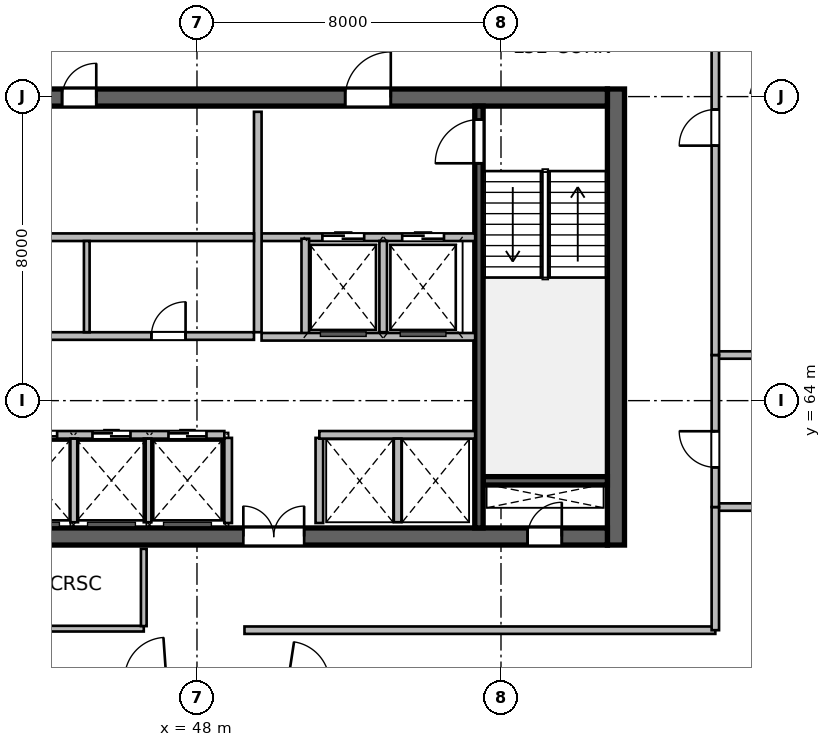
"""IFC4 building model, lengths in metres.
Left out: names, types, materials, properties, quantities, classifications, styles, units other than length and angle.
Written with IfcOpenShell. Run it as: python <this file> out.ifc"""

import sys

from ifc_helpers import new_model, si_unit, direction, frame, frame_2d, origin, place, context, subcontext, project, spatial, rectangle, extrude, source, transform, mapped, element, fill, save


model = new_model("IFC4")
c1 = context("Model", 3, precision=1e-05, world=origin(), true_north=direction((0.0, 1.0)))
c2 = subcontext(c1, "Body", "Model", "MODEL_VIEW")
j1 = project(units=[si_unit("LENGTHUNIT", "METRE"), si_unit("PLANEANGLEUNIT", "RADIAN")], contexts=[c1])
p1 = place(None, origin())
s1 = spatial("IfcSite", under=j1, at=p1, CompositionType="ELEMENT")
p2 = place(p1, origin())
s2 = spatial("IfcBuilding", under=s1, at=p2, CompositionType="ELEMENT")
p3 = place(p2, frame((0.0, 0.0, 215.7)))
s3 = spatial("IfcBuildingStorey", under=s2, at=p3, CompositionType="ELEMENT", Elevation=215.7)
m1 = source(origin(), c2, "Body", "SweptSolid", [
    extrude(rectangle(XDim=12.0, YDim=0.45, at=frame_2d((6.0, 0.0))), origin(), (0.0, 0.0, 1.0), 3.9),
])
p4 = place(p3, frame((59.025, 60.2, 0.0), z_axis=(0.0, 0.0, 1.0), x_axis=(0.0, 1.0, 0.0)))
e1 = element("IfcWall", 1, at=p4, inside=s3, PredefinedType="SHEAR", context=c2, shape_type="MappedRepresentation", body=[
    mapped(m1, transform((0.0, 0.0, 0.0), scale=1.0)),
])
m2 = source(origin(), c2, "Body", "SweptSolid", [
    extrude(rectangle(XDim=21.6, YDim=0.45, at=frame_2d((10.8, 0.0))), origin(), (0.0, 0.0, 1.0), 3.9),
])
p5 = place(p3, frame((37.2, 60.425, 0.0), z_axis=(0.0, 0.0, 1.0), x_axis=(1.0, 0.0, 0.0)))
e2 = element("IfcWall", 2, at=p5, inside=s3, PredefinedType="SHEAR", context=c2, shape_type="MappedRepresentation", body=[
    mapped(m2, transform((0.0, 0.0, 0.0), scale=1.0)),
])
p6 = place(p5, frame((1.1, 0.0, 0.0)))
e3 = element("IfcOpeningElement", 3, at=p6, cuts=e2, PredefinedType="OPENING", context=c2, shape_type="SweptSolid", body=[
    extrude(rectangle(XDim=1.15, YDim=2.15, at=frame_2d((0.575, 1.075))), frame((0.0, 0.235, 0.0), z_axis=(0.0, -1.0, 0.0), x_axis=(1.0, 0.0, 0.0)), (0.0, 0.0, 1.0), 0.47),
])
p7 = place(p5, frame((19.5, 0.0, 0.0)))
e4 = element("IfcOpeningElement", 4, at=p7, cuts=e2, PredefinedType="OPENING", context=c2, shape_type="SweptSolid", body=[
    extrude(rectangle(XDim=0.9, YDim=2.1, at=frame_2d((0.45, 1.05))), frame((0.0, 0.235, 0.0), z_axis=(0.0, -1.0, 0.0), x_axis=(1.0, 0.0, 0.0)), (0.0, 0.0, 1.0), 0.47),
])
p8 = place(p5, frame((12.02, 0.0, 0.0)))
e5 = element("IfcOpeningElement", 5, at=p8, cuts=e2, PredefinedType="OPENING", context=c2, shape_type="SweptSolid", body=[
    extrude(rectangle(XDim=1.6, YDim=2.15, at=frame_2d((0.8, 1.075))), frame((0.0, 0.235, 0.0), z_axis=(0.0, -1.0, 0.0), x_axis=(1.0, 0.0, 0.0)), (0.0, 0.0, 1.0), 0.47),
])
p9 = place(p3, frame((37.2, 71.975, 0.0), z_axis=(0.0, 0.0, 1.0), x_axis=(1.0, 0.0, 0.0)))
e6 = element("IfcWall", 6, at=p9, inside=s3, PredefinedType="SHEAR", context=c2, shape_type="MappedRepresentation", body=[
    mapped(m2, transform((0.0, 0.0, 0.0), scale=1.0)),
])
p10 = place(p9, frame((1.2, 0.0, 0.0)))
e7 = element("IfcOpeningElement", 7, at=p10, cuts=e6, PredefinedType="OPENING", context=c2, shape_type="SweptSolid", body=[
    extrude(rectangle(XDim=0.9, YDim=2.1, at=frame_2d((0.45, 1.05))), frame((0.0, 0.235, 0.0), z_axis=(0.0, -1.0, 0.0), x_axis=(1.0, 0.0, 0.0)), (0.0, 0.0, 1.0), 0.47),
])
p11 = place(p9, frame((14.7, 0.0, 0.0)))
e8 = element("IfcOpeningElement", 8, at=p11, cuts=e6, PredefinedType="OPENING", context=c2, shape_type="SweptSolid", body=[
    extrude(rectangle(XDim=1.2, YDim=2.15, at=frame_2d((0.6, 1.075))), frame((0.0, 0.235, 0.0), z_axis=(0.0, -1.0, 0.0), x_axis=(1.0, 0.0, 0.0)), (0.0, 0.0, 1.0), 0.47),
])
p12 = place(p9, frame((4.15, 0.0, 0.0)))
e9 = element("IfcOpeningElement", 9, at=p12, cuts=e6, PredefinedType="OPENING", context=c2, shape_type="SweptSolid", body=[
    extrude(rectangle(XDim=1.3, YDim=2.15, at=frame_2d((0.65, 1.075))), frame((0.0, 0.235, 0.0), z_axis=(0.0, -1.0, 0.0), x_axis=(1.0, 0.0, 0.0)), (0.0, 0.0, 1.0), 0.47),
])
p13 = place(p9, frame((7.25, 0.0, 0.0)))
e10 = element("IfcOpeningElement", 10, at=p13, cuts=e6, PredefinedType="OPENING", context=c2, shape_type="SweptSolid", body=[
    extrude(rectangle(XDim=0.9, YDim=2.1, at=frame_2d((0.45, 1.05))), frame((0.0, 0.235, 0.0), z_axis=(0.0, -1.0, 0.0), x_axis=(1.0, 0.0, 0.0)), (0.0, 0.0, 1.0), 0.47),
])
m3 = source(origin(), c2, "Body", "SweptSolid", [
    extrude(rectangle(XDim=3.27, YDim=0.22, at=frame_2d((1.635, 0.0))), origin(), (0.0, 0.0, 1.0), 3.9),
])
p14 = place(p3, frame((55.53, 61.89, 0.0), z_axis=(0.0, 0.0, 1.0), x_axis=(1.0, 0.0, 0.0)))
e11 = element("IfcWall", 11, at=p14, inside=s3, PredefinedType="SHEAR", context=c2, shape_type="MappedRepresentation", body=[
    mapped(m3, transform((0.0, 0.0, 0.0), scale=1.0)),
])
m4 = source(origin(), c2, "Body", "SweptSolid", [
    extrude(rectangle(XDim=11.1, YDim=0.22, at=frame_2d((5.55, 0.0))), origin(), (0.0, 0.0, 1.0), 3.9),
])
p15 = place(p3, frame((55.42, 60.65, 0.0), z_axis=(0.0, 0.0, 1.0), x_axis=(0.0, 1.0, 0.0)))
e12 = element("IfcWall", 12, at=p15, inside=s3, PredefinedType="SHEAR", context=c2, shape_type="MappedRepresentation", body=[
    mapped(m4, transform((0.0, 0.0, 0.0), scale=1.0)),
])
p16 = place(p15, frame((9.595, 0.0, 0.0)))
e13 = element("IfcOpeningElement", 13, at=p16, cuts=e12, PredefinedType="OPENING", context=c2, shape_type="SweptSolid", body=[
    extrude(rectangle(XDim=1.15, YDim=2.15, at=frame_2d((0.575, 1.075))), frame((0.0, 0.12, 0.0), z_axis=(0.0, -1.0, 0.0), x_axis=(1.0, 0.0, 0.0)), (0.0, 0.0, 1.0), 0.24),
])
m5 = source(origin(), c2, "Body", "SweptSolid", [
    extrude(rectangle(XDim=2.24, YDim=0.2, at=frame_2d((1.12, 0.0))), origin(), (0.0, 0.0, 1.0), 3.64),
])
for number, where, z_axis, x_axis in (
    (14, (48.82, 60.78, 0.0), (0.0, 0.0, 1.0), (0.0, 1.0, 0.0)),
    (15, (51.22, 60.78, 0.0), (0.0, 0.0, 1.0), (0.0, 1.0, 0.0)),
):
    element("IfcWall", number, at=place(p3, frame(where, z_axis=z_axis, x_axis=x_axis)), inside=s3, PredefinedType="SOLIDWALL", context=c2, shape_type="MappedRepresentation", body=[
        mapped(m5, transform((0.0, 0.0, 0.0), scale=1.0)),
    ])
m6 = source(origin(), c2, "Body", "SweptSolid", [
    extrude(rectangle(XDim=5.62, YDim=0.2, at=frame_2d((2.81, 0.0))), origin(), (0.0, 0.0, 1.0), 3.64),
])
p17 = place(p3, frame((49.7, 68.3, 0.0), z_axis=(0.0, 0.0, 1.0), x_axis=(1.0, 0.0, 0.0)))
e16 = element("IfcWall", 16, at=p17, inside=s3, PredefinedType="SOLIDWALL", context=c2, shape_type="MappedRepresentation", body=[
    mapped(m6, transform((0.0, 0.0, 0.0), scale=1.0)),
])
p18 = place(p17, frame((1.6, 0.0, 0.0)))
e17 = element("IfcOpeningElement", 17, at=p18, cuts=e16, PredefinedType="OPENING", context=c2, shape_type="SweptSolid", body=[
    extrude(rectangle(XDim=1.1, YDim=2.15, at=frame_2d((0.55, 1.075))), frame((0.0, 0.11, 0.0), z_axis=(0.0, -1.0, 0.0), x_axis=(1.0, 0.0, 0.0)), (0.0, 0.0, 1.0), 0.22),
])
p19 = place(p17, frame((3.7, 0.0, 0.0)))
e18 = element("IfcOpeningElement", 18, at=p19, cuts=e16, PredefinedType="OPENING", context=c2, shape_type="SweptSolid", body=[
    extrude(rectangle(XDim=1.1, YDim=2.15, at=frame_2d((0.55, 1.075))), frame((0.0, 0.11, 0.0), z_axis=(0.0, -1.0, 0.0), x_axis=(1.0, 0.0, 0.0)), (0.0, 0.0, 1.0), 0.22),
])
m7 = source(origin(), c2, "Body", "SweptSolid", [
    extrude(rectangle(XDim=5.8, YDim=0.2, at=frame_2d((2.9, 0.0))), origin(), (0.0, 0.0, 1.0), 3.64),
])
p20 = place(p3, frame((49.6, 65.8, 0.0), z_axis=(0.0, 0.0, 1.0), x_axis=(0.0, 1.0, 0.0)))
e19 = element("IfcWall", 19, at=p20, inside=s3, PredefinedType="SOLIDWALL", context=c2, shape_type="MappedRepresentation", body=[
    mapped(m7, transform((0.0, 0.0, 0.0), scale=1.0)),
])
m8 = source(origin(), c2, "Body", "SweptSolid", [
    extrude(rectangle(XDim=2.58, YDim=0.2, at=frame_2d((1.29, 0.0))), origin(), (0.0, 0.0, 1.0), 3.64),
])
p21 = place(p3, frame((50.85, 65.68, 0.0), z_axis=(0.0, 0.0, 1.0), x_axis=(0.0, 1.0, 0.0)))
e20 = element("IfcWall", 20, at=p21, inside=s3, PredefinedType="SOLIDWALL", context=c2, shape_type="MappedRepresentation", body=[
    mapped(m8, transform((0.0, 0.0, 0.0), scale=1.0)),
])
m9 = source(origin(), c2, "Body", "SweptSolid", [
    extrude(rectangle(XDim=2.4, YDim=0.2, at=frame_2d((1.2, 0.0))), origin(), (0.0, 0.0, 1.0), 3.64),
])
p22 = place(p3, frame((52.9, 65.8, 0.0), z_axis=(0.0, 0.0, 1.0), x_axis=(0.0, 1.0, 0.0)))
e21 = element("IfcWall", 21, at=p22, inside=s3, PredefinedType="SOLIDWALL", context=c2, shape_type="MappedRepresentation", body=[
    mapped(m9, transform((0.0, 0.0, 0.0), scale=1.0)),
])
p23 = place(p3, frame((49.7, 65.68, 0.0), z_axis=(0.0, 0.0, 1.0), x_axis=(1.0, 0.0, 0.0)))
e22 = element("IfcWall", 22, at=p23, inside=s3, PredefinedType="SOLIDWALL", context=c2, shape_type="MappedRepresentation", body=[
    mapped(m6, transform((0.0, 0.0, 0.0), scale=1.0)),
])
m10 = source(origin(), c2, "Body", "SweptSolid", [
    extrude(rectangle(XDim=8.8, YDim=0.2, at=frame_2d((4.4, 0.0))), origin(), (0.0, 0.0, 1.0), 3.64),
])
p24 = place(p3, frame((40.7, 68.3, 0.0), z_axis=(0.0, 0.0, 1.0), x_axis=(1.0, 0.0, 0.0)))
e23 = element("IfcWall", 23, at=p24, inside=s3, PredefinedType="SOLIDWALL", context=c2, shape_type="MappedRepresentation", body=[
    mapped(m10, transform((0.0, 0.0, 0.0), scale=1.0)),
])
m11 = source(origin(), c2, "Body", "SweptSolid", [
    extrude(rectangle(XDim=8.02, YDim=0.2, at=frame_2d((4.01, 0.0))), origin(), (0.0, 0.0, 1.0), 3.64),
])
p25 = place(p3, frame((40.7, 63.1, 0.0), z_axis=(0.0, 0.0, 1.0), x_axis=(1.0, 0.0, 0.0)))
e24 = element("IfcWall", 24, at=p25, inside=s3, PredefinedType="SOLIDWALL", context=c2, shape_type="MappedRepresentation", body=[
    mapped(m11, transform((0.0, 0.0, 0.0), scale=1.0)),
])
p26 = place(p25, frame((0.72, 0.0, 0.0)))
e25 = element("IfcOpeningElement", 25, at=p26, cuts=e24, PredefinedType="OPENING", context=c2, shape_type="SweptSolid", body=[
    extrude(rectangle(XDim=1.0, YDim=2.15, at=frame_2d((0.5, 1.075))), frame((0.0, 0.11, 0.0), z_axis=(0.0, -1.0, 0.0), x_axis=(1.0, 0.0, 0.0)), (0.0, 0.0, 1.0), 0.22),
])
p27 = place(p25, frame((2.62, 0.0, 0.0)))
e26 = element("IfcOpeningElement", 26, at=p27, cuts=e24, PredefinedType="OPENING", context=c2, shape_type="SweptSolid", body=[
    extrude(rectangle(XDim=1.0, YDim=2.15, at=frame_2d((0.5, 1.075))), frame((0.0, 0.11, 0.0), z_axis=(0.0, -1.0, 0.0), x_axis=(1.0, 0.0, 0.0)), (0.0, 0.0, 1.0), 0.22),
])
p28 = place(p25, frame((4.55, 0.0, 0.0)))
e27 = element("IfcOpeningElement", 27, at=p28, cuts=e24, PredefinedType="OPENING", context=c2, shape_type="SweptSolid", body=[
    extrude(rectangle(XDim=1.0, YDim=2.15, at=frame_2d((0.5, 1.075))), frame((0.0, 0.11, 0.0), z_axis=(0.0, -1.0, 0.0), x_axis=(1.0, 0.0, 0.0)), (0.0, 0.0, 1.0), 0.22),
])
p29 = place(p25, frame((6.55, 0.0, 0.0)))
e28 = element("IfcOpeningElement", 28, at=p29, cuts=e24, PredefinedType="OPENING", context=c2, shape_type="SweptSolid", body=[
    extrude(rectangle(XDim=1.0, YDim=2.15, at=frame_2d((0.5, 1.075))), frame((0.0, 0.11, 0.0), z_axis=(0.0, -1.0, 0.0), x_axis=(1.0, 0.0, 0.0)), (0.0, 0.0, 1.0), 0.22),
])
m12 = source(origin(), c2, "Body", "SweptSolid", [
    extrude(rectangle(XDim=4.1, YDim=0.2, at=frame_2d((2.05, 0.0))), origin(), (0.0, 0.0, 1.0), 3.64),
])
p30 = place(p3, frame((51.22, 63.1, 0.0), z_axis=(0.0, 0.0, 1.0), x_axis=(1.0, 0.0, 0.0)))
e29 = element("IfcWall", 29, at=p30, inside=s3, PredefinedType="SOLIDWALL", context=c2, shape_type="MappedRepresentation", body=[
    mapped(m12, transform((0.0, 0.0, 0.0), scale=1.0)),
])
m13 = source(origin(), c2, "Body", "SweptSolid", [
    extrude(rectangle(XDim=2.2, YDim=0.2, at=frame_2d((1.1, 0.0))), origin(), (0.0, 0.0, 1.0), 3.64),
])
for number, where, z_axis, x_axis in (
    (30, (44.77, 60.8, 0.0), (0.0, 0.0, 1.0), (0.0, 1.0, 0.0)),
    (31, (46.7, 60.8, 0.0), (0.0, 0.0, 1.0), (0.0, 1.0, 0.0)),
    (32, (53.28, 60.8, 0.0), (0.0, 0.0, 1.0), (0.0, 1.0, 0.0)),
):
    element("IfcWall", number, at=place(p3, frame(where, z_axis=z_axis, x_axis=x_axis)), inside=s3, PredefinedType="SOLIDWALL", context=c2, shape_type="MappedRepresentation", body=[
        mapped(m13, transform((0.0, 0.0, 0.0), scale=1.0)),
    ])
p31 = place(p3, frame((40.7, 65.7, 0.0), z_axis=(0.0, 0.0, 1.0), x_axis=(1.0, 0.0, 0.0)))
e33 = element("IfcWall", 33, at=p31, inside=s3, PredefinedType="SOLIDWALL", context=c2, shape_type="MappedRepresentation", body=[
    mapped(m10, transform((0.0, 0.0, 0.0), scale=1.0)),
])
p32 = place(p31, frame((1.6, 0.0, 0.0)))
e34 = element("IfcOpeningElement", 34, at=p32, cuts=e33, PredefinedType="OPENING", context=c2, shape_type="SweptSolid", body=[
    extrude(rectangle(XDim=0.9, YDim=2.1, at=frame_2d((0.45, 1.05))), frame((0.0, 0.11, 0.0), z_axis=(0.0, -1.0, 0.0), x_axis=(1.0, 0.0, 0.0)), (0.0, 0.0, 1.0), 0.22),
])
p33 = place(p31, frame((6.1, 0.0, 0.0)))
e35 = element("IfcOpeningElement", 35, at=p33, cuts=e33, PredefinedType="OPENING", context=c2, shape_type="SweptSolid", body=[
    extrude(rectangle(XDim=0.9, YDim=2.1, at=frame_2d((0.45, 1.05))), frame((0.0, 0.11, 0.0), z_axis=(0.0, -1.0, 0.0), x_axis=(1.0, 0.0, 0.0)), (0.0, 0.0, 1.0), 0.22),
])
m14 = source(origin(), c2, "Body", "SweptSolid", [
    extrude(rectangle(XDim=2.4, YDim=0.15, at=frame_2d((1.2, 0.0))), origin(), (0.0, 0.0, 1.0), 3.64),
])
p34 = place(p3, frame((45.1, 65.8, 0.0), z_axis=(0.0, 0.0, 1.0), x_axis=(0.0, 1.0, 0.0)))
e36 = element("IfcWall", 36, at=p34, inside=s3, PredefinedType="PARTITIONING", context=c2, shape_type="MappedRepresentation", body=[
    mapped(m14, transform((0.0, 0.0, 0.0), scale=1.0)),
])
m15 = source(origin(), c2, "Body", "SweptSolid", [
    extrude(rectangle(XDim=5.4, YDim=0.15, at=frame_2d((2.7, 0.0))), origin(), (0.0, 0.0, 1.0), 3.64),
])
p35 = place(p3, frame((41.2, 58.0, 0.0), z_axis=(0.0, 0.0, 1.0), x_axis=(1.0, 0.0, 0.0)))
e37 = element("IfcWall", 37, at=p35, inside=s3, PredefinedType="PARTITIONING", context=c2, shape_type="MappedRepresentation", body=[
    mapped(m15, transform((0.0, 0.0, 0.0), scale=1.0)),
])
m16 = source(origin(), c2, "Body", "SweptSolid", [
    extrude(rectangle(XDim=2.033, YDim=0.15, at=frame_2d((1.016, 0.0))), origin(), (0.0, 0.0, 1.0), 3.64),
])
p36 = place(p3, frame((46.6, 58.067, 0.0), z_axis=(0.0, 0.0, 1.0), x_axis=(0.0, 1.0, 0.0)))
e38 = element("IfcWall", 38, at=p36, inside=s3, PredefinedType="PARTITIONING", context=c2, shape_type="MappedRepresentation", body=[
    mapped(m16, transform((0.0, 0.0, 0.0), scale=1.0)),
])
m17 = source(origin(), c2, "Body", "SweptSolid", [
    extrude(rectangle(XDim=12.39, YDim=0.195, at=frame_2d((6.195, 0.0))), origin(), (0.0, 0.0, 1.0), 3.64),
])
p37 = place(p3, frame((49.25, 57.96, 0.0), z_axis=(0.0, 0.0, 1.0), x_axis=(1.0, 0.0, 0.0)))
e39 = element("IfcWall", 39, at=p37, inside=s3, PredefinedType="PARTITIONING", context=c2, shape_type="MappedRepresentation", body=[
    mapped(m17, transform((0.0, 0.0, 0.0), scale=1.0)),
])
m18 = source(origin(), c2, "Body", "SweptSolid", [
    extrude(rectangle(XDim=18.342, YDim=0.195, at=frame_2d((9.171, 0.0))), origin(), (0.0, 0.0, 1.0), 3.64),
])
p38 = place(p3, frame((61.64, 61.2, 0.0), z_axis=(0.0, 0.0, 1.0), x_axis=(1.0, 0.0, 0.0)))
e40 = element("IfcWall", 40, at=p38, inside=s3, PredefinedType="PARTITIONING", context=c2, shape_type="MappedRepresentation", body=[
    mapped(m18, transform((0.0, 0.0, 0.0), scale=1.0)),
])
m19 = source(origin(), c2, "Body", "SweptSolid", [
    extrude(rectangle(XDim=3.24, YDim=0.195, at=frame_2d((1.62, 0.0))), origin(), (0.0, 0.0, 1.0), 3.64),
])
p39 = place(p3, frame((61.64, 57.96, 0.0), z_axis=(0.0, 0.0, 1.0), x_axis=(0.0, 1.0, 0.0)))
e41 = element("IfcWall", 41, at=p39, inside=s3, PredefinedType="PARTITIONING", context=c2, shape_type="MappedRepresentation", body=[
    mapped(m19, transform((0.0, 0.0, 0.0), scale=1.0)),
])
m20 = source(origin(), c2, "Body", "SweptSolid", [
    extrude(rectangle(XDim=15.332, YDim=0.195, at=frame_2d((7.666, 0.0))), origin(), (0.0, 0.0, 1.0), 3.64),
])
p40 = place(p3, frame((61.64, 65.2, 0.0), z_axis=(0.0, 0.0, 1.0), x_axis=(1.0, 0.0, 0.0)))
e42 = element("IfcWall", 42, at=p40, inside=s3, PredefinedType="PARTITIONING", context=c2, shape_type="MappedRepresentation", body=[
    mapped(m20, transform((0.0, 0.0, 0.0), scale=1.0)),
])
m21 = source(origin(), c2, "Body", "SweptSolid", [
    extrude(rectangle(XDim=4.0, YDim=0.195, at=frame_2d((2.0, 0.0))), origin(), (0.0, 0.0, 1.0), 3.64),
])
p41 = place(p3, frame((61.64, 61.2, 0.0), z_axis=(0.0, 0.0, 1.0), x_axis=(0.0, 1.0, 0.0)))
e43 = element("IfcWall", 43, at=p41, inside=s3, PredefinedType="PARTITIONING", context=c2, shape_type="MappedRepresentation", body=[
    mapped(m21, transform((0.0, 0.0, 0.0), scale=1.0)),
])
p42 = place(p41, frame((1.045, 0.0, 0.0)))
e44 = element("IfcOpeningElement", 44, at=p42, cuts=e43, PredefinedType="OPENING", context=c2, shape_type="SweptSolid", body=[
    extrude(rectangle(XDim=0.95, YDim=2.1, at=frame_2d((0.475, 1.05))), frame((0.0, 0.107, 0.0), z_axis=(0.0, -1.0, 0.0), x_axis=(1.0, 0.0, 0.0)), (0.0, 0.0, 1.0), 0.215),
])
m22 = source(origin(), c2, "Body", "SweptSolid", [
    extrude(rectangle(XDim=11.969, YDim=0.195, at=frame_2d((5.984, 0.0))), origin(), (0.0, 0.0, 1.0), 3.64),
])
p43 = place(p3, frame((61.64, 65.2, 0.0), z_axis=(0.0, 0.0, 1.0), x_axis=(0.0, 1.0, 0.0)))
e45 = element("IfcWall", 45, at=p43, inside=s3, PredefinedType="PARTITIONING", context=c2, shape_type="MappedRepresentation", body=[
    mapped(m22, transform((0.0, 0.0, 0.0), scale=1.0)),
])
p44 = place(p43, frame((5.51, 0.0, 0.0)))
e46 = element("IfcOpeningElement", 46, at=p44, cuts=e45, PredefinedType="OPENING", context=c2, shape_type="SweptSolid", body=[
    extrude(rectangle(XDim=0.95, YDim=2.1, at=frame_2d((0.475, 1.05))), frame((0.0, 0.107, 0.0), z_axis=(0.0, -1.0, 0.0), x_axis=(1.0, 0.0, 0.0)), (0.0, 0.0, 1.0), 0.215),
])
m23 = source(origin(), c2, "Body", "SweptSolid", [
    extrude(rectangle(XDim=0.9, YDim=2.1, at=frame_2d((0.45, 1.05))), frame((0.0, 0.025, 0.0), z_axis=(0.0, -1.0, 0.0), x_axis=(1.0, 0.0, 0.0)), (0.0, 0.0, 1.0), 0.05),
])
p45 = place(p7, origin())
e47 = element("IfcDoor", 47, at=p45, inside=s3, OperationType="SINGLE_SWING_RIGHT", PredefinedType="DOOR", context=c2, shape_type="MappedRepresentation", body=[
    mapped(m23, transform((0.0, 0.0, 0.0), scale=1.0)),
])
fill(e4, e47)
m24 = source(origin(), c2, "Body", "SweptSolid", [
    extrude(rectangle(XDim=1.15, YDim=2.15, at=frame_2d((0.575, 1.075))), frame((0.0, 0.025, 0.0), z_axis=(0.0, -1.0, 0.0), x_axis=(1.0, 0.0, 0.0)), (0.0, 0.0, 1.0), 0.05),
])
p46 = place(p16, origin())
e48 = element("IfcDoor", 48, at=p46, inside=s3, OperationType="SINGLE_SWING_LEFT", PredefinedType="DOOR", context=c2, shape_type="MappedRepresentation", body=[
    mapped(m24, transform((0.0, 0.0, 0.0), scale=1.0)),
])
fill(e13, e48)
m25 = source(origin(), c2, "Body", "SweptSolid", [
    extrude(rectangle(XDim=1.6, YDim=2.15, at=frame_2d((0.8, 1.075))), frame((0.0, 0.025, 0.0), z_axis=(0.0, -1.0, 0.0), x_axis=(1.0, 0.0, 0.0)), (0.0, 0.0, 1.0), 0.05),
])
p47 = place(p8, origin())
e49 = element("IfcDoor", 49, at=p47, inside=s3, OperationType="DOUBLE_DOOR_SINGLE_SWING", PredefinedType="DOOR", context=c2, shape_type="MappedRepresentation", body=[
    mapped(m25, transform((0.0, 0.0, 0.0), scale=1.0)),
])
fill(e5, e49)
m26 = source(origin(), c2, "Body", "SweptSolid", [
    extrude(rectangle(XDim=1.2, YDim=2.15, at=frame_2d((0.6, 1.075))), frame((0.0, 0.025, 0.0), z_axis=(0.0, -1.0, 0.0), x_axis=(1.0, 0.0, 0.0)), (0.0, 0.0, 1.0), 0.05),
])
p48 = place(p11, origin())
e50 = element("IfcDoor", 50, at=p48, inside=s3, OperationType="SINGLE_SWING_RIGHT", PredefinedType="DOOR", context=c2, shape_type="MappedRepresentation", body=[
    mapped(m26, transform((0.0, 0.0, 0.0), scale=1.0)),
])
fill(e8, e50)
m27 = source(origin(), c2, "Body", "SweptSolid", [
    extrude(rectangle(XDim=1.1, YDim=2.15, at=frame_2d((0.55, 1.075))), frame((0.0, 0.025, 0.0), z_axis=(0.0, -1.0, 0.0), x_axis=(1.0, 0.0, 0.0)), (0.0, 0.0, 1.0), 0.05),
])
p49 = place(p18, origin())
e51 = element("IfcDoor", 51, at=p49, inside=s3, OperationType="DOUBLE_DOOR_SLIDING", PredefinedType="DOOR", context=c2, shape_type="MappedRepresentation", body=[
    mapped(m27, transform((0.0, 0.0, 0.0), scale=1.0)),
])
fill(e17, e51)
p50 = place(p19, origin())
e52 = element("IfcDoor", 52, at=p50, inside=s3, OperationType="DOUBLE_DOOR_SLIDING", PredefinedType="DOOR", context=c2, shape_type="MappedRepresentation", body=[
    mapped(m27, transform((0.0, 0.0, 0.0), scale=1.0)),
])
fill(e18, e52)
p51 = place(p13, origin())
e53 = element("IfcDoor", 53, at=p51, inside=s3, OperationType="SINGLE_SWING_RIGHT", PredefinedType="DOOR", context=c2, shape_type="MappedRepresentation", body=[
    mapped(m23, transform((0.0, 0.0, 0.0), scale=1.0)),
])
fill(e10, e53)
m28 = source(origin(), c2, "Body", "SweptSolid", [
    extrude(rectangle(XDim=1.0, YDim=2.15, at=frame_2d((0.5, 1.075))), frame((0.0, 0.025, 0.0), z_axis=(0.0, -1.0, 0.0), x_axis=(1.0, 0.0, 0.0)), (0.0, 0.0, 1.0), 0.05),
])
p52 = place(p27, origin())
e54 = element("IfcDoor", 54, at=p52, inside=s3, OperationType="DOUBLE_DOOR_SLIDING", PredefinedType="DOOR", context=c2, shape_type="MappedRepresentation", body=[
    mapped(m28, transform((0.0, 0.0, 0.0), scale=1.0)),
])
fill(e26, e54)
p53 = place(p28, origin())
e55 = element("IfcDoor", 55, at=p53, inside=s3, OperationType="DOUBLE_DOOR_SLIDING", PredefinedType="DOOR", context=c2, shape_type="MappedRepresentation", body=[
    mapped(m28, transform((0.0, 0.0, 0.0), scale=1.0)),
])
fill(e27, e55)
p54 = place(p29, origin())
e56 = element("IfcDoor", 56, at=p54, inside=s3, OperationType="DOUBLE_DOOR_SLIDING", PredefinedType="DOOR", context=c2, shape_type="MappedRepresentation", body=[
    mapped(m28, transform((0.0, 0.0, 0.0), scale=1.0)),
])
fill(e28, e56)
p55 = place(p33, origin())
e57 = element("IfcDoor", 57, at=p55, inside=s3, OperationType="SINGLE_SWING_RIGHT", PredefinedType="DOOR", context=c2, shape_type="MappedRepresentation", body=[
    mapped(m23, transform((0.0, 0.0, 0.0), scale=1.0)),
])
fill(e35, e57)
m29 = source(origin(), c2, "Body", "SweptSolid", [
    extrude(rectangle(XDim=0.95, YDim=2.1, at=frame_2d((0.475, 1.05))), frame((0.0, 0.025, 0.0), z_axis=(0.0, -1.0, 0.0), x_axis=(1.0, 0.0, 0.0)), (0.0, 0.0, 1.0), 0.05),
])
p56 = place(p42, origin())
e58 = element("IfcDoor", 58, at=p56, inside=s3, OperationType="SINGLE_SWING_RIGHT", PredefinedType="DOOR", context=c2, shape_type="MappedRepresentation", body=[
    mapped(m29, transform((0.0, 0.0, 0.0), scale=1.0)),
])
fill(e44, e58)
p57 = place(p44, origin())
e59 = element("IfcDoor", 59, at=p57, inside=s3, OperationType="SINGLE_SWING_LEFT", PredefinedType="DOOR", context=c2, shape_type="MappedRepresentation", body=[
    mapped(m29, transform((0.0, 0.0, 0.0), scale=1.0)),
])
fill(e46, e59)
save(model, sys.argv[1])
